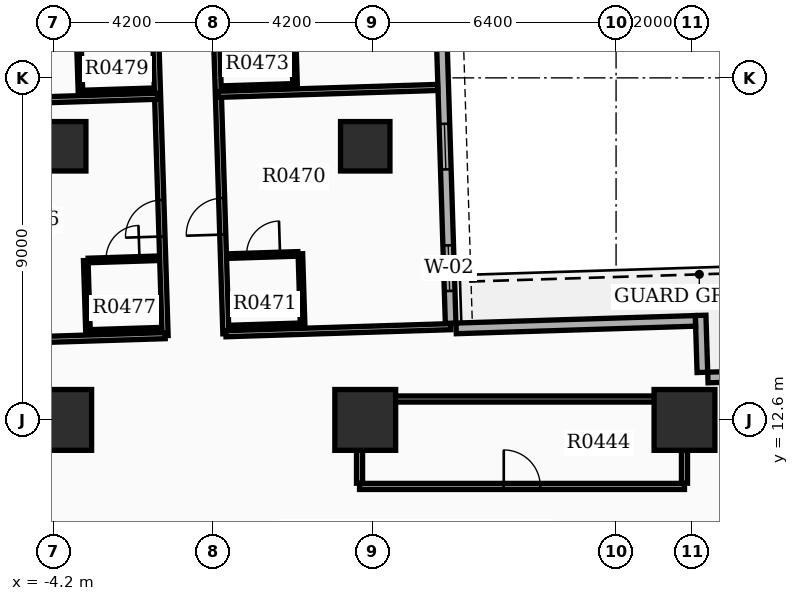
"""IFC4 building model, lengths in metres.
Left out: names, types, materials, properties, quantities, classifications, styles, units other than length and angle.
Written with IfcOpenShell. Run it as: python <this file> out.ifc"""

import sys

from ifc_helpers import new_model, si_unit, direction, frame, frame_2d, origin, origin_2d, place, context, subcontext, project, spatial, rectangle, extrude, element, fill, save


model = new_model("IFC4")
c1 = context("Model", 3, precision=1e-05, world=origin(), true_north=direction((0.0, 1.0)))
c2 = subcontext(c1, "Body", "Model", "MODEL_VIEW")
j1 = project(units=[si_unit("LENGTHUNIT", "METRE"), si_unit("PLANEANGLEUNIT", "RADIAN")], contexts=[c1])
p1 = place(None, origin())
s1 = spatial("IfcSite", under=j1, at=p1, CompositionType="ELEMENT")
p2 = place(p1, origin())
s2 = spatial("IfcBuilding", under=s1, at=p2, CompositionType="ELEMENT")
p3 = place(p2, frame((0.0, 0.0, 31.5)))
s3 = spatial("IfcBuildingStorey", under=s2, at=p3, CompositionType="ELEMENT", Elevation=31.5)
for number, where, z_axis, x_axis in (
    (1, (12.4, 12.6, 0.0), (0.0, 0.0, 1.0), (1.0, 0.0, 0.0)),
    (2, (4.0, 12.6, 0.0), (0.0, 0.0, 1.0), (1.0, 0.0, 0.0)),
    (3, (-4.0, 12.6, 0.0), (0.0, 0.0, 1.0), (1.0, 0.0, 0.0)),
):
    element("IfcColumn", number, at=place(p3, frame(where, z_axis=z_axis, x_axis=x_axis)), inside=s3, PredefinedType="COLUMN", context=c2, shape_type="SweptSolid", body=[
        extrude(rectangle(XDim=1.6, YDim=1.6, at=origin_2d()), origin(), (0.0, 0.0, 1.0), 3.9),
    ])
for number, where, z_axis, x_axis in (
    (4, (-4.0, 19.8, 0.0), (0.0, 0.0, 1.0), (1.0, 0.0, 0.0)),
    (5, (4.0, 19.8, 0.0), (0.0, 0.0, 1.0), (1.0, 0.0, 0.0)),
):
    element("IfcColumn", number, at=place(p3, frame(where, z_axis=z_axis, x_axis=x_axis)), inside=s3, PredefinedType="COLUMN", context=c2, shape_type="SweptSolid", body=[
        extrude(rectangle(XDim=1.3, YDim=1.3, at=origin_2d()), origin(), (0.0, 0.0, 1.0), 3.9),
    ])
p4 = place(p3, frame((6.247, 15.144, 0.0), z_axis=(0.0, 0.0, 1.0), x_axis=(-0.031398187845, 0.999506955354, 0.0)))
e6 = element("IfcWall", 6, at=p4, inside=s3, PredefinedType="STANDARD", context=c2, shape_type="SweptSolid", body=[
    extrude(rectangle(XDim=20.1, YDim=0.28, at=frame_2d((10.05, 0.0))), origin(), (0.0, 0.0, 1.0), 2.91),
])
p5 = place(p4, frame((0.85, 0.0, 0.8)))
e7 = element("IfcOpeningElement", 7, at=p5, cuts=e6, PredefinedType="OPENING", context=c2, shape_type="SweptSolid", body=[
    extrude(rectangle(XDim=1.2, YDim=1.6, at=frame_2d((0.6, 0.8))), frame((0.0, 0.15, 0.0), z_axis=(0.0, -1.0, 0.0), x_axis=(1.0, 0.0, 0.0)), (0.0, 0.0, 1.0), 0.3),
])
p6 = place(p4, frame((4.05, 0.0, 0.8)))
e8 = element("IfcOpeningElement", 8, at=p6, cuts=e6, PredefinedType="OPENING", context=c2, shape_type="SweptSolid", body=[
    extrude(rectangle(XDim=1.2, YDim=1.6, at=frame_2d((0.6, 0.8))), frame((0.0, 0.15, 0.0), z_axis=(0.0, -1.0, 0.0), x_axis=(1.0, 0.0, 0.0)), (0.0, 0.0, 1.0), 0.3),
])
p7 = place(p4, frame((7.25, 0.0, 0.8)))
e9 = element("IfcOpeningElement", 9, at=p7, cuts=e6, PredefinedType="OPENING", context=c2, shape_type="SweptSolid", body=[
    extrude(rectangle(XDim=1.2, YDim=1.6, at=frame_2d((0.6, 0.8))), frame((0.0, 0.15, 0.0), z_axis=(0.0, -1.0, 0.0), x_axis=(1.0, 0.0, 0.0)), (0.0, 0.0, 1.0), 0.3),
])
p8 = place(p4, frame((10.45, 0.0, 0.8)))
e10 = element("IfcOpeningElement", 10, at=p8, cuts=e6, PredefinedType="OPENING", context=c2, shape_type="SweptSolid", body=[
    extrude(rectangle(XDim=1.2, YDim=1.6, at=frame_2d((0.6, 0.8))), frame((0.0, 0.15, 0.0), z_axis=(0.0, -1.0, 0.0), x_axis=(1.0, 0.0, 0.0)), (0.0, 0.0, 1.0), 0.3),
])
p9 = place(p3, frame((14.235, 13.754, 0.0), z_axis=(0.0, 0.0, 1.0), x_axis=(-0.999506398264, -0.031415916822, 0.0)))
e11 = element("IfcWall", 11, at=p9, inside=s3, PredefinedType="STANDARD", context=c2, shape_type="SweptSolid", body=[
    extrude(rectangle(XDim=1.22, YDim=0.28, at=frame_2d((0.61, 0.0))), origin(), (0.0, 0.0, 1.0), 2.91),
])
p10 = place(p3, frame((12.871, 13.851, 0.0), z_axis=(0.0, 0.0, 1.0), x_axis=(-0.031412596484, 0.999506502621, 0.0)))
e12 = element("IfcWall", 12, at=p10, inside=s3, PredefinedType="STANDARD", context=c2, shape_type="SweptSolid", body=[
    extrude(rectangle(XDim=1.5, YDim=0.28, at=frame_2d((0.75, 0.0))), origin(), (0.0, 0.0, 1.0), 2.91),
])
p11 = place(p3, frame((12.689, 15.206, 0.0), z_axis=(0.0, 0.0, 1.0), x_axis=(-0.999507262922, -0.031388395416, 0.0)))
e13 = element("IfcWall", 13, at=p11, inside=s3, PredefinedType="STANDARD", context=c2, shape_type="SweptSolid", body=[
    extrude(rectangle(XDim=6.3, YDim=0.28, at=frame_2d((3.15, 0.0))), origin(), (0.0, 0.0, 1.0), 2.91),
])
p12 = place(p3, frame((3.85, 10.85, 0.0), z_axis=(0.0, 0.0, 1.0), x_axis=(1.0, 0.0, 0.0)))
e14 = element("IfcWall", 14, at=p12, inside=s3, PredefinedType="PARTITIONING", context=c2, shape_type="SweptSolid", body=[
    extrude(rectangle(XDim=8.55, YDim=0.16, at=frame_2d((4.275, 0.0))), origin(), (0.0, 0.0, 1.0), 2.9),
])
p13 = place(p12, frame((3.795, 0.0, 0.0)))
e15 = element("IfcOpeningElement", 15, at=p13, cuts=e14, PredefinedType="OPENING", context=c2, shape_type="SweptSolid", body=[
    extrude(rectangle(XDim=0.96, YDim=2.15, at=frame_2d((0.48, 1.075))), frame((0.0, 0.09, 0.0), z_axis=(0.0, -1.0, 0.0), x_axis=(1.0, 0.0, 0.0)), (0.0, 0.0, 1.0), 0.18),
])
p14 = place(p3, frame((3.85, 13.15, 0.0), z_axis=(0.0, 0.0, 1.0), x_axis=(1.0, 0.0, 0.0)))
e16 = element("IfcWall", 16, at=p14, inside=s3, PredefinedType="PARTITIONING", context=c2, shape_type="SweptSolid", body=[
    extrude(rectangle(XDim=8.55, YDim=0.16, at=frame_2d((4.275, 0.0))), origin(), (0.0, 0.0, 1.0), 2.9),
])
for number, where, z_axis, x_axis in (
    (17, (3.85, 10.935, 0.0), (0.0, 0.0, 1.0), (0.0, 1.0, 0.0)),
    (18, (12.4, 10.935, 0.0), (0.0, 0.0, 1.0), (0.0, 1.0, 0.0)),
):
    element("IfcWall", number, at=place(p3, frame(where, z_axis=z_axis, x_axis=x_axis)), inside=s3, PredefinedType="PARTITIONING", context=c2, shape_type="SweptSolid", body=[
        extrude(rectangle(XDim=2.13, YDim=0.16, at=frame_2d((1.065, 0.0))), origin(), (0.0, 0.0, 1.0), 2.9),
    ])
p15 = place(p3, frame((0.333, 14.868, 0.0), z_axis=(0.0, 0.0, 1.0), x_axis=(-0.031416030536, 0.99950639469, 0.0)))
e19 = element("IfcWall", 19, at=p15, inside=s3, PredefinedType="PARTITIONING", context=c2, shape_type="SweptSolid", body=[
    extrude(rectangle(XDim=20.182, YDim=0.16, at=frame_2d((10.091, 0.0))), origin(), (0.0, 0.0, 1.0), 2.9),
])
p16 = place(p15, frame((2.61, 0.0, 0.0)))
e20 = element("IfcOpeningElement", 20, at=p16, cuts=e19, PredefinedType="OPENING", context=c2, shape_type="SweptSolid", body=[
    extrude(rectangle(XDim=0.96, YDim=2.15, at=frame_2d((0.48, 1.075))), frame((0.0, 0.09, 0.0), z_axis=(0.0, -1.0, 0.0), x_axis=(1.0, 0.0, 0.0)), (0.0, 0.0, 1.0), 0.18),
])
p17 = place(p15, frame((8.994, 0.0, 0.0)))
e21 = element("IfcOpeningElement", 21, at=p17, cuts=e19, PredefinedType="OPENING", context=c2, shape_type="SweptSolid", body=[
    extrude(rectangle(XDim=0.96, YDim=2.15, at=frame_2d((0.48, 1.075))), frame((0.0, 0.09, 0.0), z_axis=(0.0, -1.0, 0.0), x_axis=(1.0, 0.0, 0.0)), (0.0, 0.0, 1.0), 0.18),
])
p18 = place(p15, frame((18.93, 0.0, 0.0)))
e22 = element("IfcOpeningElement", 22, at=p18, cuts=e19, PredefinedType="OPENING", context=c2, shape_type="SweptSolid", body=[
    extrude(rectangle(XDim=0.96, YDim=2.15, at=frame_2d((0.48, 1.075))), frame((0.0, 0.09, 0.0), z_axis=(0.0, -1.0, 0.0), x_axis=(1.0, 0.0, 0.0)), (0.0, 0.0, 1.0), 0.18),
])
p19 = place(p3, frame((0.333, 14.868, 0.0), z_axis=(0.0, 0.0, 1.0), x_axis=(0.999507397699, 0.031384103385, 0.0)))
e23 = element("IfcWall", 23, at=p19, inside=s3, PredefinedType="PARTITIONING", context=c2, shape_type="SweptSolid", body=[
    extrude(rectangle(XDim=5.92, YDim=0.16, at=frame_2d((2.96, 0.0))), origin(), (0.0, 0.0, 1.0), 2.9),
])
p20 = place(p3, frame((0.135, 21.167, 0.0), z_axis=(0.0, 0.0, 1.0), x_axis=(0.999507360361, 0.031385292484, 0.0)))
e24 = element("IfcWall", 24, at=p20, inside=s3, PredefinedType="PARTITIONING", context=c2, shape_type="SweptSolid", body=[
    extrude(rectangle(XDim=5.772, YDim=0.16, at=frame_2d((2.886, 0.0))), origin(), (0.0, 0.0, 1.0), 2.9),
])
p21 = place(p3, frame((0.409, 16.911, 0.0), z_axis=(0.0, 0.0, 1.0), x_axis=(0.999503004171, 0.03152371574, 0.0)))
e25 = element("IfcWall", 25, at=p21, inside=s3, PredefinedType="PARTITIONING", context=c2, shape_type="SweptSolid", body=[
    extrude(rectangle(XDim=1.82, YDim=0.12, at=frame_2d((0.91, 0.0))), origin(), (0.0, 0.0, 1.0), 2.9),
])
p22 = place(p21, frame((0.47, 0.0, 0.0)))
e26 = element("IfcOpeningElement", 26, at=p22, cuts=e25, PredefinedType="OPENING", context=c2, shape_type="SweptSolid", body=[
    extrude(rectangle(XDim=0.88, YDim=2.1, at=frame_2d((0.44, 1.05))), frame((0.0, 0.07, 0.0), z_axis=(0.0, -1.0, 0.0), x_axis=(1.0, 0.0, 0.0)), (0.0, 0.0, 1.0), 0.14),
])
p23 = place(p3, frame((0.468, 15.032, 0.0), z_axis=(0.0, 0.0, 1.0), x_axis=(0.999503004171, 0.03152371574, 0.0)))
e27 = element("IfcWall", 27, at=p23, inside=s3, PredefinedType="PARTITIONING", context=c2, shape_type="SweptSolid", body=[
    extrude(rectangle(XDim=1.82, YDim=0.12, at=frame_2d((0.91, 0.0))), origin(), (0.0, 0.0, 1.0), 2.9),
])
p24 = place(p3, frame((2.352, 15.091, 0.0), z_axis=(0.0, 0.0, 1.0), x_axis=(-0.031295563454, 0.999510173889, 0.0)))
e28 = element("IfcWall", 28, at=p24, inside=s3, PredefinedType="PARTITIONING", context=c2, shape_type="SweptSolid", body=[
    extrude(rectangle(XDim=1.88, YDim=0.12, at=frame_2d((0.94, 0.0))), origin(), (0.0, 0.0, 1.0), 2.9),
])
p25 = place(p3, frame((0.27, 21.331, 0.0), z_axis=(0.0, 0.0, 1.0), x_axis=(0.999507221803, 0.031389704724, 0.0)))
e29 = element("IfcWall", 29, at=p25, inside=s3, PredefinedType="PARTITIONING", context=c2, shape_type="SweptSolid", body=[
    extrude(rectangle(XDim=1.82, YDim=0.12, at=frame_2d((0.91, 0.0))), origin(), (0.0, 0.0, 1.0), 2.9),
])
p26 = place(p3, frame((2.154, 21.39, 0.0), z_axis=(0.0, 0.0, 1.0), x_axis=(-0.031425292588, 0.999506103526, 0.0)))
e30 = element("IfcWall", 30, at=p26, inside=s3, PredefinedType="PARTITIONING", context=c2, shape_type="SweptSolid", body=[
    extrude(rectangle(XDim=1.88, YDim=0.12, at=frame_2d((0.94, 0.0))), origin(), (0.0, 0.0, 1.0), 2.9),
])
p27 = place(p3, frame((-1.266, 14.817, 0.0), z_axis=(0.0, 0.0, 1.0), x_axis=(-0.031403565719, 0.9995067864, 0.0)))
e31 = element("IfcWall", 31, at=p27, inside=s3, PredefinedType="PARTITIONING", context=c2, shape_type="SweptSolid", body=[
    extrude(rectangle(XDim=20.182, YDim=0.16, at=frame_2d((10.091, 0.0))), origin(), (0.0, 0.0, 1.0), 2.9),
])
p28 = place(p27, frame((2.61, 0.0, 0.0)))
e32 = element("IfcOpeningElement", 32, at=p28, cuts=e31, PredefinedType="OPENING", context=c2, shape_type="SweptSolid", body=[
    extrude(rectangle(XDim=0.96, YDim=2.15, at=frame_2d((0.48, 1.075))), frame((0.0, 0.09, 0.0), z_axis=(0.0, -1.0, 0.0), x_axis=(1.0, 0.0, 0.0)), (0.0, 0.0, 1.0), 0.18),
])
p29 = place(p27, frame((8.994, 0.0, 0.0)))
e33 = element("IfcOpeningElement", 33, at=p29, cuts=e31, PredefinedType="OPENING", context=c2, shape_type="SweptSolid", body=[
    extrude(rectangle(XDim=0.96, YDim=2.15, at=frame_2d((0.48, 1.075))), frame((0.0, 0.09, 0.0), z_axis=(0.0, -1.0, 0.0), x_axis=(1.0, 0.0, 0.0)), (0.0, 0.0, 1.0), 0.18),
])
p30 = place(p27, frame((18.93, 0.0, 0.0)))
e34 = element("IfcOpeningElement", 34, at=p30, cuts=e31, PredefinedType="OPENING", context=c2, shape_type="SweptSolid", body=[
    extrude(rectangle(XDim=0.96, YDim=2.15, at=frame_2d((0.48, 1.075))), frame((0.0, 0.09, 0.0), z_axis=(0.0, -1.0, 0.0), x_axis=(1.0, 0.0, 0.0)), (0.0, 0.0, 1.0), 0.18),
])
p31 = place(p3, frame((-1.266, 14.817, 0.0), z_axis=(0.0, 0.0, 1.0), x_axis=(-0.999507397699, -0.031384103385, 0.0)))
e35 = element("IfcWall", 35, at=p31, inside=s3, PredefinedType="PARTITIONING", context=c2, shape_type="SweptSolid", body=[
    extrude(rectangle(XDim=5.92, YDim=0.16, at=frame_2d((2.96, 0.0))), origin(), (0.0, 0.0, 1.0), 2.9),
])
p32 = place(p3, frame((-1.464, 21.116, 0.0), z_axis=(0.0, 0.0, 1.0), x_axis=(-0.999506032581, -0.031427548972, 0.0)))
e36 = element("IfcWall", 36, at=p32, inside=s3, PredefinedType="PARTITIONING", context=c2, shape_type="SweptSolid", body=[
    extrude(rectangle(XDim=5.772, YDim=0.16, at=frame_2d((2.886, 0.0))), origin(), (0.0, 0.0, 1.0), 2.9),
])
p33 = place(p3, frame((-3.289, 16.795, 0.0), z_axis=(0.0, 0.0, 1.0), x_axis=(0.999507221803, 0.031389704724, 0.0)))
e37 = element("IfcWall", 37, at=p33, inside=s3, PredefinedType="PARTITIONING", context=c2, shape_type="SweptSolid", body=[
    extrude(rectangle(XDim=1.82, YDim=0.12, at=frame_2d((0.91, 0.0))), origin(), (0.0, 0.0, 1.0), 2.9),
])
p34 = place(p33, frame((0.47, 0.0, 0.0)))
e38 = element("IfcOpeningElement", 38, at=p34, cuts=e37, PredefinedType="OPENING", context=c2, shape_type="SweptSolid", body=[
    extrude(rectangle(XDim=0.88, YDim=2.1, at=frame_2d((0.44, 1.05))), frame((0.0, 0.07, 0.0), z_axis=(0.0, -1.0, 0.0), x_axis=(1.0, 0.0, 0.0)), (0.0, 0.0, 1.0), 0.14),
])
p35 = place(p3, frame((-3.23, 14.916, 0.0), z_axis=(0.0, 0.0, 1.0), x_axis=(0.999507221803, 0.031389704724, 0.0)))
e39 = element("IfcWall", 39, at=p35, inside=s3, PredefinedType="PARTITIONING", context=c2, shape_type="SweptSolid", body=[
    extrude(rectangle(XDim=1.82, YDim=0.12, at=frame_2d((0.91, 0.0))), origin(), (0.0, 0.0, 1.0), 2.9),
])
p36 = place(p3, frame((-3.295, 14.914, 0.0), z_axis=(0.0, 0.0, 1.0), x_axis=(-0.031295563454, 0.999510173889, 0.0)))
e40 = element("IfcWall", 40, at=p36, inside=s3, PredefinedType="PARTITIONING", context=c2, shape_type="SweptSolid", body=[
    extrude(rectangle(XDim=1.88, YDim=0.12, at=frame_2d((0.94, 0.0))), origin(), (0.0, 0.0, 1.0), 2.9),
])
p37 = place(p3, frame((-3.428, 21.215, 0.0), z_axis=(0.0, 0.0, 1.0), x_axis=(0.999507221803, 0.031389704724, 0.0)))
e41 = element("IfcWall", 41, at=p37, inside=s3, PredefinedType="PARTITIONING", context=c2, shape_type="SweptSolid", body=[
    extrude(rectangle(XDim=1.82, YDim=0.12, at=frame_2d((0.91, 0.0))), origin(), (0.0, 0.0, 1.0), 2.9),
])
p38 = place(p3, frame((-3.493, 21.213, 0.0), z_axis=(0.0, 0.0, 1.0), x_axis=(-0.031425292588, 0.999506103526, 0.0)))
e42 = element("IfcWall", 42, at=p38, inside=s3, PredefinedType="PARTITIONING", context=c2, shape_type="SweptSolid", body=[
    extrude(rectangle(XDim=1.88, YDim=0.12, at=frame_2d((0.94, 0.0))), origin(), (0.0, 0.0, 1.0), 2.9),
])
p39 = place(p5, origin())
e43 = element("IfcWindow", 43, at=p39, inside=s3, PartitioningType="SINGLE_PANEL", PredefinedType="WINDOW", context=c2, shape_type="SweptSolid", body=[
    extrude(rectangle(XDim=1.2, YDim=1.6, at=frame_2d((0.6, 0.8))), frame((0.0, 0.03, 0.0), z_axis=(0.0, -1.0, 0.0), x_axis=(1.0, 0.0, 0.0)), (0.0, 0.0, 1.0), 0.06),
])
fill(e7, e43)
p40 = place(p6, origin())
e44 = element("IfcWindow", 44, at=p40, inside=s3, PartitioningType="SINGLE_PANEL", PredefinedType="WINDOW", context=c2, shape_type="SweptSolid", body=[
    extrude(rectangle(XDim=1.2, YDim=1.6, at=frame_2d((0.6, 0.8))), frame((0.0, 0.03, 0.0), z_axis=(0.0, -1.0, 0.0), x_axis=(1.0, 0.0, 0.0)), (0.0, 0.0, 1.0), 0.06),
])
fill(e8, e44)
p41 = place(p13, origin())
e45 = element("IfcDoor", 45, at=p41, inside=s3, OperationType="SINGLE_SWING_LEFT", PredefinedType="DOOR", context=c2, shape_type="SweptSolid", body=[
    extrude(rectangle(XDim=0.96, YDim=2.15, at=frame_2d((0.48, 1.075))), frame((0.0, 0.025, 0.0), z_axis=(0.0, -1.0, 0.0), x_axis=(1.0, 0.0, 0.0)), (0.0, 0.0, 1.0), 0.05),
])
fill(e15, e45)
p42 = place(p16, origin())
e46 = element("IfcDoor", 46, at=p42, inside=s3, OperationType="SINGLE_SWING_LEFT", PredefinedType="DOOR", context=c2, shape_type="SweptSolid", body=[
    extrude(rectangle(XDim=0.96, YDim=2.15, at=frame_2d((0.48, 1.075))), frame((0.0, 0.025, 0.0), z_axis=(0.0, -1.0, 0.0), x_axis=(1.0, 0.0, 0.0)), (0.0, 0.0, 1.0), 0.05),
])
fill(e20, e46)
p43 = place(p22, origin())
e47 = element("IfcDoor", 47, at=p43, inside=s3, OperationType="SINGLE_SWING_RIGHT", PredefinedType="DOOR", context=c2, shape_type="SweptSolid", body=[
    extrude(rectangle(XDim=0.88, YDim=2.1, at=frame_2d((0.44, 1.05))), frame((0.0, 0.025, 0.0), z_axis=(0.0, -1.0, 0.0), x_axis=(1.0, 0.0, 0.0)), (0.0, 0.0, 1.0), 0.05),
])
fill(e26, e47)
p44 = place(p28, origin())
e48 = element("IfcDoor", 48, at=p44, inside=s3, OperationType="SINGLE_SWING_LEFT", PredefinedType="DOOR", context=c2, shape_type="SweptSolid", body=[
    extrude(rectangle(XDim=0.96, YDim=2.15, at=frame_2d((0.48, 1.075))), frame((0.0, 0.025, 0.0), z_axis=(0.0, -1.0, 0.0), x_axis=(1.0, 0.0, 0.0)), (0.0, 0.0, 1.0), 0.05),
])
fill(e32, e48)
p45 = place(p34, origin())
e49 = element("IfcDoor", 49, at=p45, inside=s3, OperationType="SINGLE_SWING_RIGHT", PredefinedType="DOOR", context=c2, shape_type="SweptSolid", body=[
    extrude(rectangle(XDim=0.88, YDim=2.1, at=frame_2d((0.44, 1.05))), frame((0.0, 0.025, 0.0), z_axis=(0.0, -1.0, 0.0), x_axis=(1.0, 0.0, 0.0)), (0.0, 0.0, 1.0), 0.05),
])
fill(e38, e49)
save(model, sys.argv[1])
